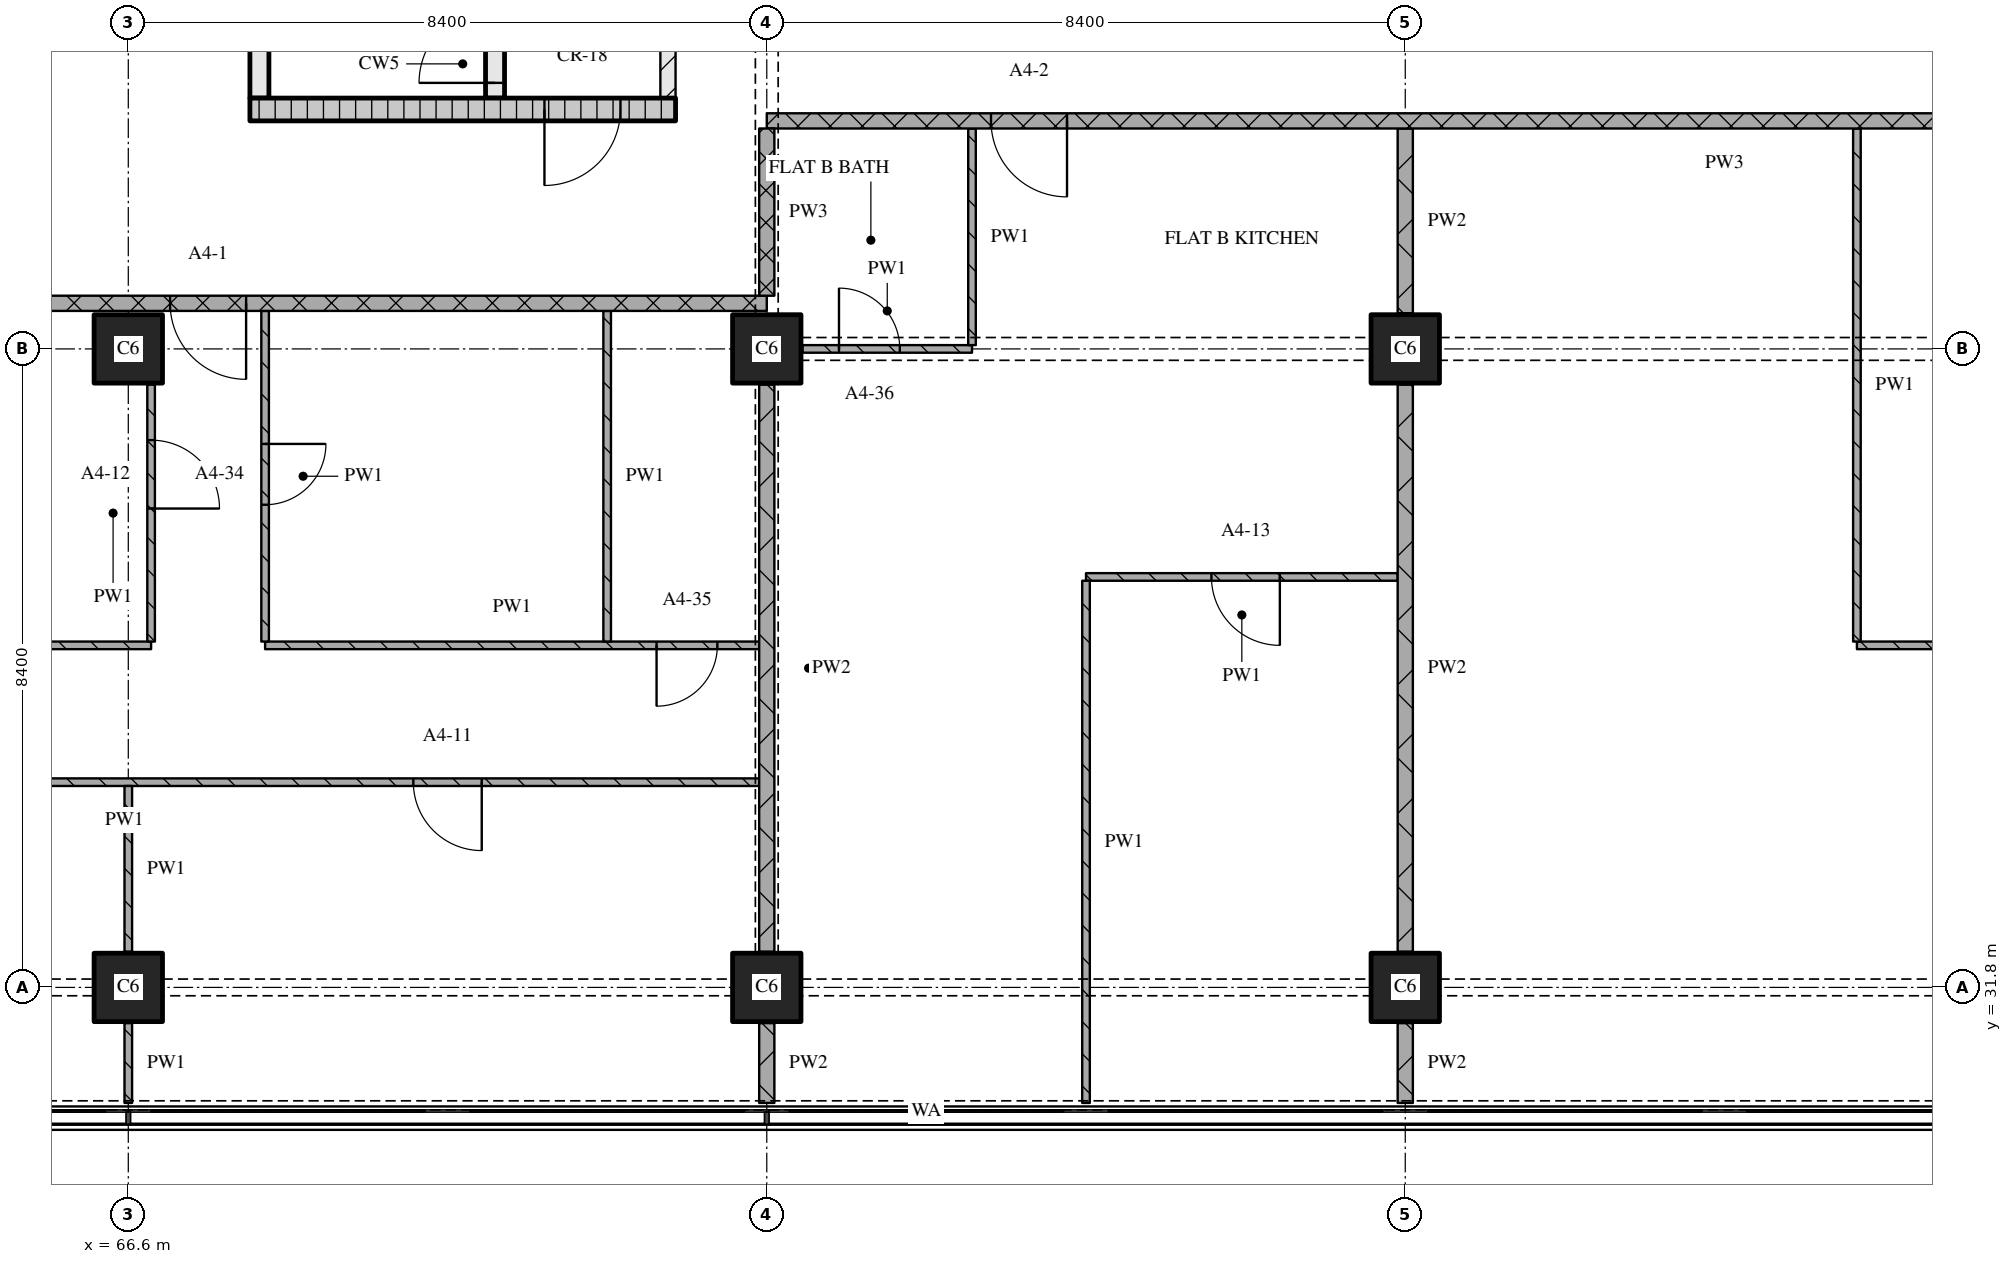
"""IFC4 building model, lengths in metres.
Left out: names, types, materials, properties, quantities, classifications, styles, units other than length and angle.
Written with IfcOpenShell. Run it as: python <this file> out.ifc"""

import sys

from ifc_helpers import new_model, si_unit, direction, frame, frame_2d, origin, origin_2d, place, context, subcontext, project, spatial, rectangle, extrude, element, fill, save


model = new_model("IFC4")
c1 = context("Model", 3, precision=1e-05, world=origin(), true_north=direction((0.0, 1.0)))
c2 = subcontext(c1, "Body", "Model", "MODEL_VIEW")
j1 = project(units=[si_unit("LENGTHUNIT", "METRE"), si_unit("PLANEANGLEUNIT", "RADIAN")], contexts=[c1])
p1 = place(None, origin())
s1 = spatial("IfcSite", under=j1, at=p1, CompositionType="ELEMENT")
p2 = place(p1, origin())
s2 = spatial("IfcBuilding", under=s1, at=p2, CompositionType="ELEMENT")
p3 = place(p2, frame((0.0, 0.0, 69.6)))
s3 = spatial("IfcBuildingStorey", under=s2, at=p3, CompositionType="ELEMENT", Elevation=69.6)
for number, where, z_axis, x_axis in (
    (1, (66.6, 31.8, 0.0), (0.0, 0.0, 1.0), (1.0, 0.0, 0.0)),
    (2, (66.6, 40.2, 0.0), (0.0, 0.0, 1.0), (1.0, 0.0, 0.0)),
    (3, (75.0, 31.8, 0.0), (0.0, 0.0, 1.0), (1.0, 0.0, 0.0)),
    (4, (75.0, 40.2, 0.0), (0.0, 0.0, 1.0), (1.0, 0.0, 0.0)),
    (5, (83.4, 31.8, 0.0), (0.0, 0.0, 1.0), (1.0, 0.0, 0.0)),
    (6, (83.4, 40.2, 0.0), (0.0, 0.0, 1.0), (1.0, 0.0, 0.0)),
):
    element("IfcColumn", number, at=place(p3, frame(where, z_axis=z_axis, x_axis=x_axis)), inside=s3, PredefinedType="COLUMN", context=c2, shape_type="SweptSolid", body=[
        extrude(rectangle(XDim=0.9, YDim=0.9, at=origin_2d()), origin(), (0.0, 0.0, 1.0), 3.6),
    ])
p4 = place(p3, frame((68.2, 43.35, 0.0), z_axis=(0.0, 0.0, 1.0), x_axis=(1.0, 0.0, 0.0)))
e7 = element("IfcWall", 7, at=p4, inside=s3, PredefinedType="SOLIDWALL", context=c2, shape_type="SweptSolid", body=[
    extrude(rectangle(XDim=5.6, YDim=0.3, at=frame_2d((2.8, 0.0))), origin(), (0.0, 0.0, 1.0), 3.32),
])
p5 = place(p4, frame((3.875, 0.0, 0.0)))
e8 = element("IfcOpeningElement", 8, at=p5, cuts=e7, PredefinedType="OPENING", context=c2, shape_type="SweptSolid", body=[
    extrude(rectangle(XDim=1.0, YDim=2.1, at=frame_2d((0.5, 1.05))), frame((0.0, 0.16, 0.0), z_axis=(0.0, -1.0, 0.0), x_axis=(1.0, 0.0, 0.0)), (0.0, 0.0, 1.0), 0.32),
])
p6 = place(p3, frame((68.325, 43.5, 0.0), z_axis=(0.0, 0.0, 1.0), x_axis=(0.0, 1.0, 0.0)))
e9 = element("IfcWall", 9, at=p6, inside=s3, PredefinedType="SOLIDWALL", context=c2, shape_type="SweptSolid", body=[
    extrude(rectangle(XDim=6.9, YDim=0.25, at=frame_2d((3.45, 0.0))), origin(), (0.0, 0.0, 1.0), 3.32),
])
p7 = place(p3, frame((71.425, 43.5, 0.0), z_axis=(0.0, 0.0, 1.0), x_axis=(0.0, 1.0, 0.0)))
e10 = element("IfcWall", 10, at=p7, inside=s3, PredefinedType="SOLIDWALL", context=c2, shape_type="SweptSolid", body=[
    extrude(rectangle(XDim=6.9, YDim=0.25, at=frame_2d((3.45, 0.0))), origin(), (0.0, 0.0, 1.0), 3.32),
])
p8 = place(p7, frame((0.2, 0.0, 0.0)))
e11 = element("IfcOpeningElement", 11, at=p8, cuts=e10, PredefinedType="OPENING", context=c2, shape_type="SweptSolid", body=[
    extrude(rectangle(XDim=1.0, YDim=2.1, at=frame_2d((0.5, 1.05))), frame((0.0, 0.135, 0.0), z_axis=(0.0, -1.0, 0.0), x_axis=(1.0, 0.0, 0.0)), (0.0, 0.0, 1.0), 0.27),
])
p9 = place(p3, frame((73.7, 43.5, 0.0), z_axis=(0.0, 0.0, 1.0), x_axis=(0.0, 1.0, 0.0)))
e12 = element("IfcWall", 12, at=p9, inside=s3, PredefinedType="PARTITIONING", context=c2, shape_type="SweptSolid", body=[
    extrude(rectangle(XDim=6.9, YDim=0.2, at=frame_2d((3.45, 0.0))), origin(), (0.0, 0.0, 1.0), 3.32),
])
p10 = place(p9, frame((1.0, 0.0, 0.0)))
e13 = element("IfcOpeningElement", 13, at=p10, cuts=e12, PredefinedType="OPENING", context=c2, shape_type="SweptSolid", body=[
    extrude(rectangle(XDim=1.0, YDim=2.1, at=frame_2d((0.5, 1.05))), frame((0.0, 0.11, 0.0), z_axis=(0.0, -1.0, 0.0), x_axis=(1.0, 0.0, 0.0)), (0.0, 0.0, 1.0), 0.22),
])
p11 = place(p3, frame((74.9, 34.5, 0.0), z_axis=(0.0, 0.0, 1.0), x_axis=(-1.0, 0.0, 0.0)))
e14 = element("IfcWall", 14, at=p11, inside=s3, PredefinedType="PARTITIONING", context=c2, shape_type="SweptSolid", body=[
    extrude(rectangle(XDim=16.7, YDim=0.1, at=frame_2d((8.35, 0.0))), origin(), (0.0, 0.0, 1.0), 3.32),
])
p12 = place(p11, frame((3.65, 0.0, 0.0)))
e15 = element("IfcOpeningElement", 15, at=p12, cuts=e14, PredefinedType="OPENING", context=c2, shape_type="SweptSolid", body=[
    extrude(rectangle(XDim=0.9, YDim=2.1, at=frame_2d((0.45, 1.05))), frame((0.0, 0.06, 0.0), z_axis=(0.0, -1.0, 0.0), x_axis=(1.0, 0.0, 0.0)), (0.0, 0.0, 1.0), 0.12),
])
p13 = place(p11, frame((12.05, 0.0, 0.0)))
e16 = element("IfcOpeningElement", 16, at=p13, cuts=e14, PredefinedType="OPENING", context=c2, shape_type="SweptSolid", body=[
    extrude(rectangle(XDim=0.9, YDim=2.1, at=frame_2d((0.45, 1.05))), frame((0.0, 0.06, 0.0), z_axis=(0.0, -1.0, 0.0), x_axis=(1.0, 0.0, 0.0)), (0.0, 0.0, 1.0), 0.12),
])
p14 = place(p3, frame((55.5, 36.3, 0.0), z_axis=(0.0, 0.0, 1.0), x_axis=(1.0, 0.0, 0.0)))
e17 = element("IfcWall", 17, at=p14, inside=s3, PredefinedType="PARTITIONING", context=c2, shape_type="SweptSolid", body=[
    extrude(rectangle(XDim=11.4, YDim=0.1, at=frame_2d((5.7, 0.0))), origin(), (0.0, 0.0, 1.0), 3.32),
])
p15 = place(p3, frame((68.4, 36.3, 0.0), z_axis=(0.0, 0.0, 1.0), x_axis=(1.0, 0.0, 0.0)))
e18 = element("IfcWall", 18, at=p15, inside=s3, PredefinedType="PARTITIONING", context=c2, shape_type="SweptSolid", body=[
    extrude(rectangle(XDim=6.5, YDim=0.1, at=frame_2d((3.25, 0.0))), origin(), (0.0, 0.0, 1.0), 3.32),
])
p16 = place(p15, frame((5.15, 0.0, 0.0)))
e19 = element("IfcOpeningElement", 19, at=p16, cuts=e18, PredefinedType="OPENING", context=c2, shape_type="SweptSolid", body=[
    extrude(rectangle(XDim=0.8, YDim=2.1, at=frame_2d((0.4, 1.05))), frame((0.0, 0.06, 0.0), z_axis=(0.0, -1.0, 0.0), x_axis=(1.0, 0.0, 0.0)), (0.0, 0.0, 1.0), 0.12),
])
p17 = place(p3, frame((89.342, 36.3, 0.0), z_axis=(0.0, 0.0, 1.0), x_axis=(1.0, 0.0, 0.0)))
e20 = element("IfcWall", 20, at=p17, inside=s3, PredefinedType="PARTITIONING", context=c2, shape_type="SweptSolid", body=[
    extrude(rectangle(XDim=3.658, YDim=0.1, at=frame_2d((1.829, 0.0))), origin(), (0.0, 0.0, 1.0), 3.32),
])
p18 = place(p17, frame((1.379, 0.0, 0.0)))
e21 = element("IfcOpeningElement", 21, at=p18, cuts=e20, PredefinedType="OPENING", context=c2, shape_type="SweptSolid", body=[
    extrude(rectangle(XDim=0.9, YDim=2.1, at=frame_2d((0.45, 1.05))), frame((0.0, 0.06, 0.0), z_axis=(0.0, -1.0, 0.0), x_axis=(1.0, 0.0, 0.0)), (0.0, 0.0, 1.0), 0.12),
])
p19 = place(p3, frame((83.3, 37.2, 0.0), z_axis=(0.0, 0.0, 1.0), x_axis=(-1.0, 0.0, 0.0)))
e22 = element("IfcWall", 22, at=p19, inside=s3, PredefinedType="PARTITIONING", context=c2, shape_type="SweptSolid", body=[
    extrude(rectangle(XDim=4.1, YDim=0.1, at=frame_2d((2.05, 0.0))), origin(), (0.0, 0.0, 1.0), 3.32),
])
p20 = place(p19, frame((1.55, 0.0, 0.0)))
e23 = element("IfcOpeningElement", 23, at=p20, cuts=e22, PredefinedType="OPENING", context=c2, shape_type="SweptSolid", body=[
    extrude(rectangle(XDim=0.9, YDim=2.1, at=frame_2d((0.45, 1.05))), frame((0.0, 0.06, 0.0), z_axis=(0.0, -1.0, 0.0), x_axis=(1.0, 0.0, 0.0)), (0.0, 0.0, 1.0), 0.12),
])
p21 = place(p3, frame((75.47, 40.2, 0.0), z_axis=(0.0, 0.0, 1.0), x_axis=(1.0, 0.0, 0.0)))
e24 = element("IfcWall", 24, at=p21, inside=s3, PredefinedType="PARTITIONING", context=c2, shape_type="SweptSolid", body=[
    extrude(rectangle(XDim=2.23, YDim=0.1, at=frame_2d((1.115, 0.0))), origin(), (0.0, 0.0, 1.0), 2.83),
])
p22 = place(p21, frame((0.48, 0.0, 0.0)))
e25 = element("IfcOpeningElement", 25, at=p22, cuts=e24, PredefinedType="OPENING", context=c2, shape_type="SweptSolid", body=[
    extrude(rectangle(XDim=0.8, YDim=2.1, at=frame_2d((0.4, 1.05))), frame((0.0, 0.06, 0.0), z_axis=(0.0, -1.0, 0.0), x_axis=(1.0, 0.0, 0.0)), (0.0, 0.0, 1.0), 0.12),
])
p23 = place(p3, frame((75.0, 40.8, 0.0), z_axis=(0.0, 0.0, 1.0), x_axis=(-1.0, 0.0, 0.0)))
e26 = element("IfcWall", 26, at=p23, inside=s3, PredefinedType="PARTITIONING", context=c2, shape_type="SweptSolid", body=[
    extrude(rectangle(XDim=24.08, YDim=0.2, at=frame_2d((12.04, 0.0))), origin(), (0.0, 0.0, 1.0), 3.32),
])
p24 = place(p23, frame((6.85, 0.0, 0.0)))
e27 = element("IfcOpeningElement", 27, at=p24, cuts=e26, PredefinedType="OPENING", context=c2, shape_type="SweptSolid", body=[
    extrude(rectangle(XDim=1.0, YDim=2.1, at=frame_2d((0.5, 1.05))), frame((0.0, 0.11, 0.0), z_axis=(0.0, -1.0, 0.0), x_axis=(1.0, 0.0, 0.0)), (0.0, 0.0, 1.0), 0.22),
])
p25 = place(p3, frame((100.2, 43.2, 0.0), z_axis=(0.0, 0.0, 1.0), x_axis=(-1.0, 0.0, 0.0)))
e28 = element("IfcWall", 28, at=p25, inside=s3, PredefinedType="PARTITIONING", context=c2, shape_type="SweptSolid", body=[
    extrude(rectangle(XDim=25.2, YDim=0.2, at=frame_2d((12.6, 0.0))), origin(), (0.0, 0.0, 1.0), 3.32),
])
p26 = place(p25, frame((5.95, 0.0, 0.0)))
e29 = element("IfcOpeningElement", 29, at=p26, cuts=e28, PredefinedType="OPENING", context=c2, shape_type="SweptSolid", body=[
    extrude(rectangle(XDim=1.0, YDim=2.1, at=frame_2d((0.5, 1.05))), frame((0.0, 0.11, 0.0), z_axis=(0.0, -1.0, 0.0), x_axis=(1.0, 0.0, 0.0)), (0.0, 0.0, 1.0), 0.22),
])
p27 = place(p25, frame((21.25, 0.0, 0.0)))
e30 = element("IfcOpeningElement", 30, at=p27, cuts=e28, PredefinedType="OPENING", context=c2, shape_type="SweptSolid", body=[
    extrude(rectangle(XDim=1.0, YDim=2.1, at=frame_2d((0.5, 1.05))), frame((0.0, 0.11, 0.0), z_axis=(0.0, -1.0, 0.0), x_axis=(1.0, 0.0, 0.0)), (0.0, 0.0, 1.0), 0.22),
])
p28 = place(p3, frame((66.6, 31.33, 0.0), z_axis=(0.0, 0.0, 1.0), x_axis=(0.0, -1.0, 0.0)))
e31 = element("IfcWall", 31, at=p28, inside=s3, PredefinedType="PARTITIONING", context=c2, shape_type="SweptSolid", body=[
    extrude(rectangle(XDim=1.05, YDim=0.1, at=frame_2d((0.525, 0.0))), origin(), (0.0, 0.0, 1.0), 3.32),
])
p29 = place(p3, frame((66.6, 34.45, 0.0), z_axis=(0.0, 0.0, 1.0), x_axis=(0.0, -1.0, 0.0)))
e32 = element("IfcWall", 32, at=p29, inside=s3, PredefinedType="PARTITIONING", context=c2, shape_type="SweptSolid", body=[
    extrude(rectangle(XDim=2.18, YDim=0.1, at=frame_2d((1.09, 0.0))), origin(), (0.0, 0.0, 1.0), 3.32),
])
p30 = place(p3, frame((66.9, 36.35, 0.0), z_axis=(0.0, 0.0, 1.0), x_axis=(0.0, 1.0, 0.0)))
e33 = element("IfcWall", 33, at=p30, inside=s3, PredefinedType="PARTITIONING", context=c2, shape_type="SweptSolid", body=[
    extrude(rectangle(XDim=3.38, YDim=0.1, at=frame_2d((1.69, 0.0))), origin(), (0.0, 0.0, 1.0), 3.32),
])
p31 = place(p30, frame((1.75, 0.0, 0.0)))
e34 = element("IfcOpeningElement", 34, at=p31, cuts=e33, PredefinedType="OPENING", context=c2, shape_type="SweptSolid", body=[
    extrude(rectangle(XDim=0.9, YDim=2.1, at=frame_2d((0.45, 1.05))), frame((0.0, 0.06, 0.0), z_axis=(0.0, -1.0, 0.0), x_axis=(1.0, 0.0, 0.0)), (0.0, 0.0, 1.0), 0.12),
])
p32 = place(p3, frame((68.4, 40.7, 0.0), z_axis=(0.0, 0.0, 1.0), x_axis=(0.0, -1.0, 0.0)))
e35 = element("IfcWall", 35, at=p32, inside=s3, PredefinedType="PARTITIONING", context=c2, shape_type="SweptSolid", body=[
    extrude(rectangle(XDim=4.35, YDim=0.1, at=frame_2d((2.175, 0.0))), origin(), (0.0, 0.0, 1.0), 3.32),
])
p33 = place(p32, frame((1.75, 0.0, 0.0)))
e36 = element("IfcOpeningElement", 36, at=p33, cuts=e35, PredefinedType="OPENING", context=c2, shape_type="SweptSolid", body=[
    extrude(rectangle(XDim=0.8, YDim=2.1, at=frame_2d((0.4, 1.05))), frame((0.0, 0.06, 0.0), z_axis=(0.0, -1.0, 0.0), x_axis=(1.0, 0.0, 0.0)), (0.0, 0.0, 1.0), 0.12),
])
p34 = place(p3, frame((72.9, 40.7, 0.0), z_axis=(0.0, 0.0, 1.0), x_axis=(0.0, -1.0, 0.0)))
e37 = element("IfcWall", 37, at=p34, inside=s3, PredefinedType="PARTITIONING", context=c2, shape_type="SweptSolid", body=[
    extrude(rectangle(XDim=4.35, YDim=0.1, at=frame_2d((2.175, 0.0))), origin(), (0.0, 0.0, 1.0), 3.32),
])
p35 = place(p3, frame((75.0, 43.1, 0.0), z_axis=(0.0, 0.0, 1.0), x_axis=(0.0, -1.0, 0.0)))
e38 = element("IfcWall", 38, at=p35, inside=s3, PredefinedType="PARTITIONING", context=c2, shape_type="SweptSolid", body=[
    extrude(rectangle(XDim=2.2, YDim=0.2, at=frame_2d((1.1, 0.0))), origin(), (0.0, 0.0, 1.0), 2.43),
])
p36 = place(p3, frame((75.0, 31.33, 0.0), z_axis=(0.0, 0.0, 1.0), x_axis=(0.0, -1.0, 0.0)))
e39 = element("IfcWall", 39, at=p36, inside=s3, PredefinedType="PARTITIONING", context=c2, shape_type="SweptSolid", body=[
    extrude(rectangle(XDim=1.05, YDim=0.2, at=frame_2d((0.525, 0.0))), origin(), (0.0, 0.0, 1.0), 3.32),
])
p37 = place(p3, frame((75.0, 39.73, 0.0), z_axis=(0.0, 0.0, 1.0), x_axis=(0.0, -1.0, 0.0)))
e40 = element("IfcWall", 40, at=p37, inside=s3, PredefinedType="PARTITIONING", context=c2, shape_type="SweptSolid", body=[
    extrude(rectangle(XDim=7.46, YDim=0.2, at=frame_2d((3.73, 0.0))), origin(), (0.0, 0.0, 1.0), 2.83),
])
p38 = place(p3, frame((77.7, 43.1, 0.0), z_axis=(0.0, 0.0, 1.0), x_axis=(0.0, -1.0, 0.0)))
e41 = element("IfcWall", 41, at=p38, inside=s3, PredefinedType="PARTITIONING", context=c2, shape_type="SweptSolid", body=[
    extrude(rectangle(XDim=2.85, YDim=0.1, at=frame_2d((1.425, 0.0))), origin(), (0.0, 0.0, 1.0), 3.32),
])
p39 = place(p3, frame((79.2, 37.15, 0.0), z_axis=(0.0, 0.0, 1.0), x_axis=(0.0, -1.0, 0.0)))
e42 = element("IfcWall", 42, at=p39, inside=s3, PredefinedType="PARTITIONING", context=c2, shape_type="SweptSolid", body=[
    extrude(rectangle(XDim=6.87, YDim=0.1, at=frame_2d((3.435, 0.0))), origin(), (0.0, 0.0, 1.0), 3.32),
])
p40 = place(p3, frame((83.4, 31.33, 0.0), z_axis=(0.0, 0.0, 1.0), x_axis=(0.0, -1.0, 0.0)))
e43 = element("IfcWall", 43, at=p40, inside=s3, PredefinedType="PARTITIONING", context=c2, shape_type="SweptSolid", body=[
    extrude(rectangle(XDim=1.05, YDim=0.2, at=frame_2d((0.525, 0.0))), origin(), (0.0, 0.0, 1.0), 3.32),
])
p41 = place(p3, frame((83.4, 39.73, 0.0), z_axis=(0.0, 0.0, 1.0), x_axis=(0.0, -1.0, 0.0)))
e44 = element("IfcWall", 44, at=p41, inside=s3, PredefinedType="PARTITIONING", context=c2, shape_type="SweptSolid", body=[
    extrude(rectangle(XDim=7.46, YDim=0.2, at=frame_2d((3.73, 0.0))), origin(), (0.0, 0.0, 1.0), 3.32),
])
p42 = place(p3, frame((83.4, 43.1, 0.0), z_axis=(0.0, 0.0, 1.0), x_axis=(0.0, -1.0, 0.0)))
e45 = element("IfcWall", 45, at=p42, inside=s3, PredefinedType="PARTITIONING", context=c2, shape_type="SweptSolid", body=[
    extrude(rectangle(XDim=2.43, YDim=0.2, at=frame_2d((1.215, 0.0))), origin(), (0.0, 0.0, 1.0), 3.32),
])
p43 = place(p3, frame((89.342, 43.1, 0.0), z_axis=(0.0, 0.0, 1.0), x_axis=(0.0, -1.0, 0.0)))
e46 = element("IfcWall", 46, at=p43, inside=s3, PredefinedType="PARTITIONING", context=c2, shape_type="SweptSolid", body=[
    extrude(rectangle(XDim=6.75, YDim=0.1, at=frame_2d((3.375, 0.0))), origin(), (0.0, 0.0, 1.0), 3.32),
])
p44 = place(p5, origin())
e47 = element("IfcDoor", 47, at=p44, inside=s3, OperationType="SINGLE_SWING_RIGHT", PredefinedType="DOOR", context=c2, shape_type="SweptSolid", body=[
    extrude(rectangle(XDim=1.0, YDim=2.1, at=frame_2d((0.5, 1.05))), frame((0.0, 0.025, 0.0), z_axis=(0.0, -1.0, 0.0), x_axis=(1.0, 0.0, 0.0)), (0.0, 0.0, 1.0), 0.05),
])
fill(e8, e47)
p45 = place(p8, origin())
e48 = element("IfcDoor", 48, at=p45, inside=s3, OperationType="SINGLE_SWING_LEFT", PredefinedType="DOOR", context=c2, shape_type="SweptSolid", body=[
    extrude(rectangle(XDim=1.0, YDim=2.1, at=frame_2d((0.5, 1.05))), frame((0.0, 0.025, 0.0), z_axis=(0.0, -1.0, 0.0), x_axis=(1.0, 0.0, 0.0)), (0.0, 0.0, 1.0), 0.05),
])
fill(e11, e48)
p46 = place(p12, origin())
e49 = element("IfcDoor", 49, at=p46, inside=s3, OperationType="SINGLE_SWING_LEFT", PredefinedType="DOOR", context=c2, shape_type="SweptSolid", body=[
    extrude(rectangle(XDim=0.9, YDim=2.1, at=frame_2d((0.45, 1.05))), frame((0.0, 0.025, 0.0), z_axis=(0.0, -1.0, 0.0), x_axis=(1.0, 0.0, 0.0)), (0.0, 0.0, 1.0), 0.05),
])
fill(e15, e49)
p47 = place(p16, origin())
e50 = element("IfcDoor", 50, at=p47, inside=s3, OperationType="SINGLE_SWING_RIGHT", PredefinedType="DOOR", context=c2, shape_type="SweptSolid", body=[
    extrude(rectangle(XDim=0.8, YDim=2.1, at=frame_2d((0.4, 1.05))), frame((0.0, 0.025, 0.0), z_axis=(0.0, -1.0, 0.0), x_axis=(1.0, 0.0, 0.0)), (0.0, 0.0, 1.0), 0.05),
])
fill(e19, e50)
p48 = place(p20, origin())
e51 = element("IfcDoor", 51, at=p48, inside=s3, OperationType="SINGLE_SWING_LEFT", PredefinedType="DOOR", context=c2, shape_type="SweptSolid", body=[
    extrude(rectangle(XDim=0.9, YDim=2.1, at=frame_2d((0.45, 1.05))), frame((0.0, 0.025, 0.0), z_axis=(0.0, -1.0, 0.0), x_axis=(1.0, 0.0, 0.0)), (0.0, 0.0, 1.0), 0.05),
])
fill(e23, e51)
p49 = place(p22, origin())
e52 = element("IfcDoor", 52, at=p49, inside=s3, OperationType="SINGLE_SWING_LEFT", PredefinedType="DOOR", context=c2, shape_type="SweptSolid", body=[
    extrude(rectangle(XDim=0.8, YDim=2.1, at=frame_2d((0.4, 1.05))), frame((0.0, 0.025, 0.0), z_axis=(0.0, -1.0, 0.0), x_axis=(1.0, 0.0, 0.0)), (0.0, 0.0, 1.0), 0.05),
])
fill(e25, e52)
p50 = place(p24, origin())
e53 = element("IfcDoor", 53, at=p50, inside=s3, OperationType="SINGLE_SWING_LEFT", PredefinedType="DOOR", context=c2, shape_type="SweptSolid", body=[
    extrude(rectangle(XDim=1.0, YDim=2.1, at=frame_2d((0.5, 1.05))), frame((0.0, 0.025, 0.0), z_axis=(0.0, -1.0, 0.0), x_axis=(1.0, 0.0, 0.0)), (0.0, 0.0, 1.0), 0.05),
])
fill(e27, e53)
p51 = place(p27, origin())
e54 = element("IfcDoor", 54, at=p51, inside=s3, OperationType="SINGLE_SWING_LEFT", PredefinedType="DOOR", context=c2, shape_type="SweptSolid", body=[
    extrude(rectangle(XDim=1.0, YDim=2.1, at=frame_2d((0.5, 1.05))), frame((0.0, 0.025, 0.0), z_axis=(0.0, -1.0, 0.0), x_axis=(1.0, 0.0, 0.0)), (0.0, 0.0, 1.0), 0.05),
])
fill(e30, e54)
p52 = place(p31, origin())
e55 = element("IfcDoor", 55, at=p52, inside=s3, OperationType="SINGLE_SWING_RIGHT", PredefinedType="DOOR", context=c2, shape_type="SweptSolid", body=[
    extrude(rectangle(XDim=0.9, YDim=2.1, at=frame_2d((0.45, 1.05))), frame((0.0, 0.025, 0.0), z_axis=(0.0, -1.0, 0.0), x_axis=(1.0, 0.0, 0.0)), (0.0, 0.0, 1.0), 0.05),
])
fill(e34, e55)
p53 = place(p33, origin())
e56 = element("IfcDoor", 56, at=p53, inside=s3, OperationType="SINGLE_SWING_LEFT", PredefinedType="DOOR", context=c2, shape_type="SweptSolid", body=[
    extrude(rectangle(XDim=0.8, YDim=2.1, at=frame_2d((0.4, 1.05))), frame((0.0, 0.025, 0.0), z_axis=(0.0, -1.0, 0.0), x_axis=(1.0, 0.0, 0.0)), (0.0, 0.0, 1.0), 0.05),
])
fill(e36, e56)
save(model, sys.argv[1])
